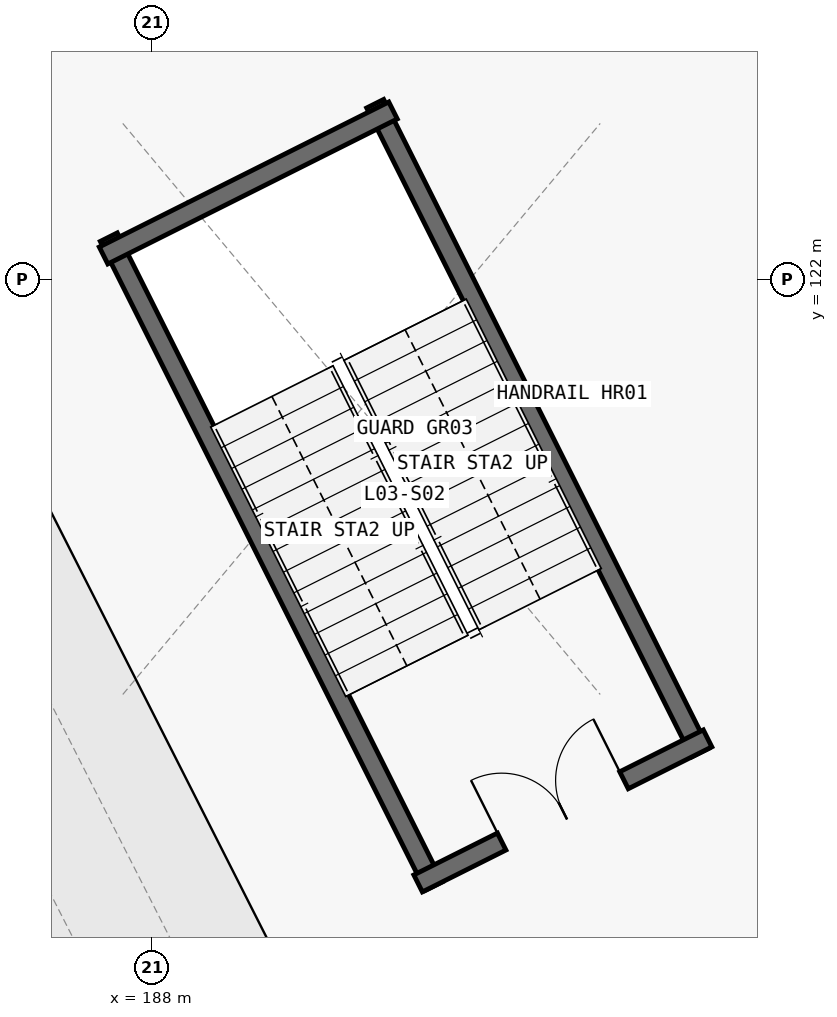
"""IFC4 building model, lengths in metres.
Left out: names, types, materials, properties, quantities, classifications, styles, units other than length and angle.
Written with IfcOpenShell. Run it as: python <this file> out.ifc"""

import sys

from ifc_helpers import new_model, si_unit, direction, frame, frame_2d, origin, place, context, subcontext, project, spatial, rectangle, extrude, element, fill, save


model = new_model("IFC4")
c1 = context("Model", 3, precision=1e-05, world=origin(), true_north=direction((0.0, 1.0)))
c2 = subcontext(c1, "Body", "Model", "MODEL_VIEW")
j1 = project(units=[si_unit("LENGTHUNIT", "METRE"), si_unit("PLANEANGLEUNIT", "RADIAN")], contexts=[c1])
p1 = place(None, origin())
s1 = spatial("IfcSite", under=j1, at=p1, CompositionType="ELEMENT")
p2 = place(p1, origin())
s2 = spatial("IfcBuilding", under=s1, at=p2, CompositionType="ELEMENT")
p3 = place(p2, frame((0.0, 0.0, 15.0)))
s3 = spatial("IfcBuildingStorey", under=s2, at=p3, CompositionType="ELEMENT", Elevation=15.0)
for number, where, z_axis, x_axis in (
    (1, (195.215, 115.774, 0.0), (0.0, 0.0, 1.0), (-0.448, 0.894, 0.0)),
    (2, (187.432, 122.557, 0.0), (0.0, 0.0, 1.0), (0.448, -0.894, 0.0)),
):
    element("IfcWall", number, at=place(p3, frame(where, z_axis=z_axis, x_axis=x_axis)), inside=s3, PredefinedType="SHEAR", context=c2, shape_type="SweptSolid", body=[
        extrude(rectangle(XDim=9.55, YDim=0.25, at=frame_2d((4.775, 0.0))), origin(), (0.0, 0.0, 1.0), 4.54),
    ])
p4 = place(p3, frame((191.502, 114.054, 0.0), z_axis=(0.0, 0.0, 1.0), x_axis=(0.89409454548, 0.447878268888, 0.0)))
e3 = element("IfcWall", 3, at=p4, inside=s3, PredefinedType="SHEAR", context=c2, shape_type="SweptSolid", body=[
    extrude(rectangle(XDim=4.26, YDim=0.25, at=frame_2d((2.13, 0.0))), origin(), (0.0, 0.0, 1.0), 4.54),
])
p5 = place(p4, frame((1.23, 0.0, 0.0)))
e4 = element("IfcOpeningElement", 4, at=p5, cuts=e3, PredefinedType="OPENING", context=c2, shape_type="SweptSolid", body=[
    extrude(rectangle(XDim=1.8, YDim=2.25, at=frame_2d((0.9, 1.125))), frame((0.0, 0.135, 0.0), z_axis=(0.0, -1.0, 0.0), x_axis=(1.0, 0.0, 0.0)), (0.0, 0.0, 1.0), 0.27),
])
p6 = place(p3, frame((191.172, 124.223, 0.0), z_axis=(0.0, 0.0, 1.0), x_axis=(-0.89409454548, -0.447878268888, 0.0)))
e5 = element("IfcWall", 5, at=p6, inside=s3, PredefinedType="SHEAR", context=c2, shape_type="SweptSolid", body=[
    extrude(rectangle(XDim=4.26, YDim=0.25, at=frame_2d((2.13, 0.0))), origin(), (0.0, 0.0, 1.0), 4.54),
])
p7 = place(p5, origin())
e6 = element("IfcDoor", 6, at=p7, inside=s3, OperationType="DOUBLE_DOOR_SINGLE_SWING", PredefinedType="DOOR", context=c2, shape_type="SweptSolid", body=[
    extrude(rectangle(XDim=1.8, YDim=2.25, at=frame_2d((0.9, 1.125))), frame((0.0, 0.025, 0.0), z_axis=(0.0, -1.0, 0.0), x_axis=(1.0, 0.0, 0.0)), (0.0, 0.0, 1.0), 0.05),
])
fill(e4, e6)
save(model, sys.argv[1])
